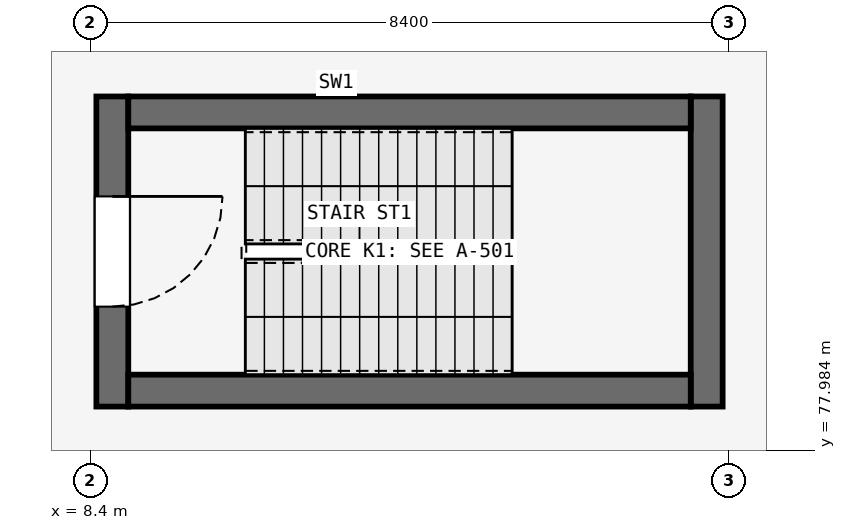
"""IFC4 building model, lengths in metres.
Left out: names, types, materials, properties, quantities, classifications, styles, units other than length and angle.
Written with IfcOpenShell. Run it as: python <this file> out.ifc"""

import sys

from ifc_helpers import new_model, si_unit, direction, frame, frame_2d, origin, place, context, subcontext, project, spatial, rectangle, extrude, element, fill, save


model = new_model("IFC4")
c1 = context("Model", 3, precision=1e-05, world=origin(), true_north=direction((0.0, 1.0)))
c2 = subcontext(c1, "Body", "Model", "MODEL_VIEW")
j1 = project(units=[si_unit("LENGTHUNIT", "METRE"), si_unit("PLANEANGLEUNIT", "RADIAN")], contexts=[c1])
p1 = place(None, origin())
s1 = spatial("IfcSite", under=j1, at=p1, CompositionType="ELEMENT")
p2 = place(p1, origin())
s2 = spatial("IfcBuilding", under=s1, at=p2, CompositionType="ELEMENT")
p3 = place(p2, frame((0.0, 0.0, 14.4)))
s3 = spatial("IfcBuildingStorey", under=s2, at=p3, CompositionType="ELEMENT", Elevation=14.4)
p4 = place(p3, frame((8.69, 82.64, 0.0), z_axis=(0.0, 0.0, 1.0), x_axis=(0.0, -1.0, 0.0)))
e1 = element("IfcWall", 1, at=p4, inside=s3, PredefinedType="SHEAR", context=c2, shape_type="SweptSolid", body=[
    extrude(rectangle(XDim=4.08, YDim=0.42, at=frame_2d((2.04, 0.0))), origin(), (0.0, 0.0, 1.0), 4.2),
])
p5 = place(p4, frame((1.315, 0.0, 0.0)))
e2 = element("IfcOpeningElement", 2, at=p5, cuts=e1, PredefinedType="OPENING", context=c2, shape_type="SweptSolid", body=[
    extrude(rectangle(XDim=1.45, YDim=2.2, at=frame_2d((0.725, 1.1))), frame((0.0, 0.22, 0.0), z_axis=(0.0, -1.0, 0.0), x_axis=(1.0, 0.0, 0.0)), (0.0, 0.0, 1.0), 0.44),
])
p6 = place(p3, frame((16.51, 78.56, 0.0), z_axis=(0.0, 0.0, 1.0), x_axis=(0.0, 1.0, 0.0)))
e3 = element("IfcWall", 3, at=p6, inside=s3, PredefinedType="SHEAR", context=c2, shape_type="SweptSolid", body=[
    extrude(rectangle(XDim=4.08, YDim=0.42, at=frame_2d((2.04, 0.0))), origin(), (0.0, 0.0, 1.0), 4.2),
])
for number, where, z_axis, x_axis in (
    (4, (8.9, 78.77, 0.0), (0.0, 0.0, 1.0), (1.0, 0.0, 0.0)),
    (5, (8.9, 82.43, 0.0), (0.0, 0.0, 1.0), (1.0, 0.0, 0.0)),
):
    element("IfcWall", number, at=place(p3, frame(where, z_axis=z_axis, x_axis=x_axis)), inside=s3, PredefinedType="SHEAR", context=c2, shape_type="SweptSolid", body=[
        extrude(rectangle(XDim=7.4, YDim=0.42, at=frame_2d((3.7, 0.0))), origin(), (0.0, 0.0, 1.0), 4.2),
    ])
p7 = place(p5, origin())
e6 = element("IfcDoor", 6, at=p7, inside=s3, OperationType="SINGLE_SWING_LEFT", PredefinedType="DOOR", context=c2, shape_type="SweptSolid", body=[
    extrude(rectangle(XDim=1.45, YDim=2.2, at=frame_2d((0.725, 1.1))), frame((0.0, 0.025, 0.0), z_axis=(0.0, -1.0, 0.0), x_axis=(1.0, 0.0, 0.0)), (0.0, 0.0, 1.0), 0.05),
])
fill(e2, e6)
save(model, sys.argv[1])
